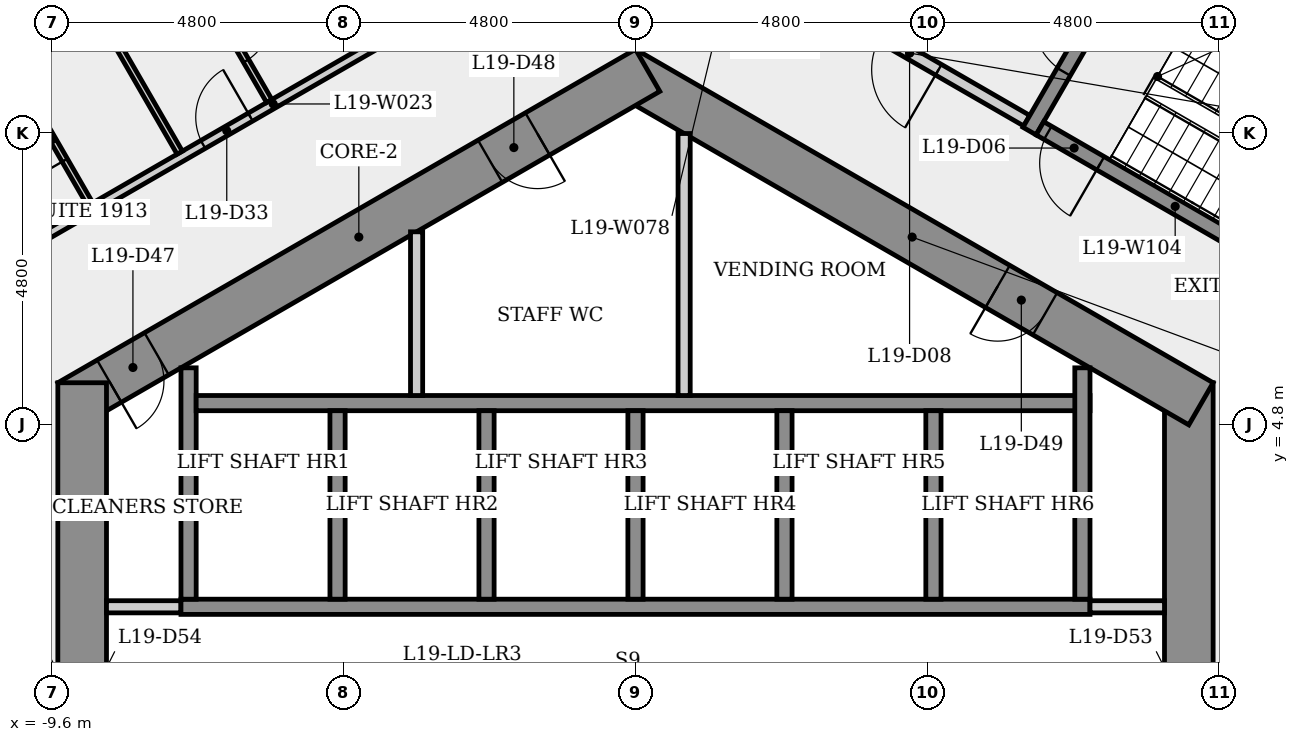
"""IFC4 building model, lengths in metres.
Left out: names, types, materials, properties, quantities, classifications, styles, units other than length and angle.
Written with IfcOpenShell. Run it as: python <this file> out.ifc"""

import sys

from ifc_helpers import new_model, si_unit, direction, frame, frame_2d, origin, place, context, subcontext, project, spatial, rectangle, extrude, element, fill, save


model = new_model("IFC4")
c1 = context("Model", 3, precision=1e-05, world=origin(), true_north=direction((0.0, 1.0)))
c2 = subcontext(c1, "Body", "Model", "MODEL_VIEW")
j1 = project(units=[si_unit("LENGTHUNIT", "METRE"), si_unit("PLANEANGLEUNIT", "RADIAN")], contexts=[c1])
p1 = place(None, origin())
s1 = spatial("IfcSite", under=j1, at=p1, CompositionType="ELEMENT")
p2 = place(p1, origin())
s2 = spatial("IfcBuilding", under=s1, at=p2, CompositionType="ELEMENT")
p3 = place(p2, frame((0.0, 0.0, 74.3)))
s3 = spatial("IfcBuildingStorey", under=s2, at=p3, CompositionType="ELEMENT", Elevation=74.3)
p4 = place(p3, frame((9.1, -5.485, 0.0), z_axis=(0.0, 0.0, 1.0), x_axis=(0.0, 1.0, 0.0)))
e1 = element("IfcWall", 1, at=p4, inside=s3, PredefinedType="SHEAR", context=c2, shape_type="SweptSolid", body=[
    extrude(rectangle(XDim=10.97, YDim=0.8, at=frame_2d((5.485, 0.0))), origin(), (0.0, 0.0, 1.0), 4.0),
])
p5 = place(p4, frame((4.685, 0.0, 0.0)))
e2 = element("IfcOpeningElement", 2, at=p5, cuts=e1, PredefinedType="OPENING", context=c2, shape_type="SweptSolid", body=[
    extrude(rectangle(XDim=1.6, YDim=2.1, at=frame_2d((0.8, 1.05))), frame((0.0, 0.41, 0.0), z_axis=(0.0, -1.0, 0.0), x_axis=(1.0, 0.0, 0.0)), (0.0, 0.0, 1.0), 0.82),
])
p6 = place(p3, frame((9.3, 5.138, 0.0), z_axis=(0.0, 0.0, 1.0), x_axis=(-0.866023993627, 0.500002442456, 0.0)))
e3 = element("IfcWall", 3, at=p6, inside=s3, PredefinedType="SHEAR", context=c2, shape_type="SweptSolid", body=[
    extrude(rectangle(XDim=10.97, YDim=0.8, at=frame_2d((5.485, 0.0))), origin(), (0.0, 0.0, 1.0), 4.0),
])
p7 = place(p6, frame((2.962, 0.0, 0.0)))
e4 = element("IfcOpeningElement", 4, at=p7, cuts=e3, PredefinedType="OPENING", context=c2, shape_type="SweptSolid", body=[
    extrude(rectangle(XDim=0.9, YDim=2.1, at=frame_2d((0.45, 1.05))), frame((0.0, 0.41, 0.0), z_axis=(0.0, -1.0, 0.0), x_axis=(1.0, 0.0, 0.0)), (0.0, 0.0, 1.0), 0.82),
])
p8 = place(p3, frame((0.2, 10.623, 0.0), z_axis=(0.0, 0.0, 1.0), x_axis=(-0.866023993627, -0.500002442456, 0.0)))
e5 = element("IfcWall", 5, at=p8, inside=s3, PredefinedType="SHEAR", context=c2, shape_type="SweptSolid", body=[
    extrude(rectangle(XDim=10.97, YDim=0.8, at=frame_2d((5.485, 0.0))), origin(), (0.0, 0.0, 1.0), 4.0),
])
p9 = place(p8, frame((9.325, 0.0, 0.0)))
e6 = element("IfcOpeningElement", 6, at=p9, cuts=e5, PredefinedType="OPENING", context=c2, shape_type="SweptSolid", body=[
    extrude(rectangle(XDim=0.9, YDim=2.1, at=frame_2d((0.45, 1.05))), frame((0.0, 0.41, 0.0), z_axis=(0.0, -1.0, 0.0), x_axis=(1.0, 0.0, 0.0)), (0.0, 0.0, 1.0), 0.82),
])
p10 = place(p8, frame((2.091, 0.0, 0.0)))
e7 = element("IfcOpeningElement", 7, at=p10, cuts=e5, PredefinedType="OPENING", context=c2, shape_type="SweptSolid", body=[
    extrude(rectangle(XDim=0.9, YDim=2.1, at=frame_2d((0.45, 1.05))), frame((0.0, 0.41, 0.0), z_axis=(0.0, -1.0, 0.0), x_axis=(1.0, 0.0, 0.0)), (0.0, 0.0, 1.0), 0.82),
])
p11 = place(p3, frame((-9.1, 5.485, 0.0), z_axis=(0.0, 0.0, 1.0), x_axis=(0.0, -1.0, 0.0)))
e8 = element("IfcWall", 8, at=p11, inside=s3, PredefinedType="SHEAR", context=c2, shape_type="SweptSolid", body=[
    extrude(rectangle(XDim=10.97, YDim=0.8, at=frame_2d((5.485, 0.0))), origin(), (0.0, 0.0, 1.0), 4.0),
])
p12 = place(p11, frame((4.685, 0.0, 0.0)))
e9 = element("IfcOpeningElement", 9, at=p12, cuts=e8, PredefinedType="OPENING", context=c2, shape_type="SweptSolid", body=[
    extrude(rectangle(XDim=1.6, YDim=2.1, at=frame_2d((0.8, 1.05))), frame((0.0, 0.41, 0.0), z_axis=(0.0, -1.0, 0.0), x_axis=(1.0, 0.0, 0.0)), (0.0, 0.0, 1.0), 0.82),
])
p13 = place(p3, frame((-10.609, 7.385, 0.0), z_axis=(0.0, 0.0, 1.0), x_axis=(0.866027371756, 0.499996591357, 0.0)))
e10 = element("IfcWall", 10, at=p13, inside=s3, PredefinedType="PARTITIONING", context=c2, shape_type="SweptSolid", body=[
    extrude(rectangle(XDim=10.741, YDim=0.15, at=frame_2d((5.371, 0.0))), origin(), (0.0, 0.0, 1.0), 3.6),
])
p14 = place(p13, frame((4.039, 0.0, 0.0)))
e11 = element("IfcOpeningElement", 11, at=p14, cuts=e10, PredefinedType="OPENING", context=c2, shape_type="SweptSolid", body=[
    extrude(rectangle(XDim=0.9, YDim=2.1, at=frame_2d((0.45, 1.05))), frame((0.0, 0.085, 0.0), z_axis=(0.0, -1.0, 0.0), x_axis=(1.0, 0.0, 0.0)), (0.0, 0.0, 1.0), 0.17),
])
p15 = place(p3, frame((-8.968, 8.419, 0.0), z_axis=(0.0, 0.0, 1.0), x_axis=(-0.4999899861, 0.866031185235, 0.0)))
e12 = element("IfcWall", 12, at=p15, inside=s3, PredefinedType="PARTITIONING", context=c2, shape_type="SweptSolid", body=[
    extrude(rectangle(XDim=2.475, YDim=0.1, at=frame_2d((1.238, 0.0))), origin(), (0.0, 0.0, 1.0), 3.6),
])
p16 = place(p15, frame((0.837, 0.0, 0.0)))
e13 = element("IfcOpeningElement", 13, at=p16, cuts=e12, PredefinedType="OPENING", context=c2, shape_type="SweptSolid", body=[
    extrude(rectangle(XDim=0.8, YDim=2.1, at=frame_2d((0.4, 1.05))), frame((0.0, 0.06, 0.0), z_axis=(0.0, -1.0, 0.0), x_axis=(1.0, 0.0, 0.0)), (0.0, 0.0, 1.0), 0.12),
])
p17 = place(p3, frame((-8.7, 1.8, 0.0), z_axis=(0.0, 0.0, 1.0), x_axis=(1.0, 0.0, 0.0)))
e14 = element("IfcWall", 14, at=p17, inside=s3, PredefinedType="PARTITIONING", context=c2, shape_type="SweptSolid", body=[
    extrude(rectangle(XDim=1.225, YDim=0.2, at=frame_2d((0.613, 0.0))), origin(), (0.0, 0.0, 1.0), 3.6),
])
p18 = place(p3, frame((-7.496, 9.269, 0.0), z_axis=(0.0, 0.0, 1.0), x_axis=(-0.500009404554, 0.866019973994, 0.0)))
e15 = element("IfcWall", 15, at=p18, inside=s3, PredefinedType="PARTITIONING", context=c2, shape_type="SweptSolid", body=[
    extrude(rectangle(XDim=9.01, YDim=0.1, at=frame_2d((4.505, 0.0))), origin(), (0.0, 0.0, 1.0), 3.6),
])
p19 = place(p3, frame((-7.475, 1.8, 0.0), z_axis=(0.0, 0.0, 1.0), x_axis=(1.0, 0.0, 0.0)))
e16 = element("IfcWall", 16, at=p19, inside=s3, PredefinedType="SHEAR", context=c2, shape_type="SweptSolid", body=[
    extrude(rectangle(XDim=14.95, YDim=0.25, at=frame_2d((7.475, 0.0))), origin(), (0.0, 0.0, 1.0), 3.6),
])
p20 = place(p3, frame((-7.35, 1.925, 0.0), z_axis=(0.0, 0.0, 1.0), x_axis=(0.0, 1.0, 0.0)))
e17 = element("IfcWall", 17, at=p20, inside=s3, PredefinedType="SHEAR", context=c2, shape_type="SweptSolid", body=[
    extrude(rectangle(XDim=3.805, YDim=0.25, at=frame_2d((1.903, 0.0))), origin(), (0.0, 0.0, 1.0), 3.6),
])
p21 = place(p3, frame((-7.225, 5.15, 0.0), z_axis=(0.0, 0.0, 1.0), x_axis=(1.0, 0.0, 0.0)))
e18 = element("IfcWall", 18, at=p21, inside=s3, PredefinedType="SHEAR", context=c2, shape_type="SweptSolid", body=[
    extrude(rectangle(XDim=14.7, YDim=0.25, at=frame_2d((7.35, 0.0))), origin(), (0.0, 0.0, 1.0), 3.6),
])
p22 = place(p3, frame((-7.211, 12.176, 0.0), z_axis=(0.0, 0.0, 1.0), x_axis=(0.499986429846, -0.866033238375, 0.0)))
e19 = element("IfcWall", 19, at=p22, inside=s3, PredefinedType="PARTITIONING", context=c2, shape_type="SweptSolid", body=[
    extrude(rectangle(XDim=2.375, YDim=0.1, at=frame_2d((1.188, 0.0))), origin(), (0.0, 0.0, 1.0), 3.6),
])
p23 = place(p22, frame((0.812, 0.0, 0.0)))
e20 = element("IfcOpeningElement", 20, at=p23, cuts=e19, PredefinedType="OPENING", context=c2, shape_type="SweptSolid", body=[
    extrude(rectangle(XDim=0.8, YDim=2.1, at=frame_2d((0.4, 1.05))), frame((0.0, 0.06, 0.0), z_axis=(0.0, -1.0, 0.0), x_axis=(1.0, 0.0, 0.0)), (0.0, 0.0, 1.0), 0.12),
])
p24 = place(p3, frame((-4.9, 5.025, 0.0), z_axis=(0.0, 0.0, 1.0), x_axis=(0.0, -1.0, 0.0)))
e21 = element("IfcWall", 21, at=p24, inside=s3, PredefinedType="SHEAR", context=c2, shape_type="SweptSolid", body=[
    extrude(rectangle(XDim=3.1, YDim=0.25, at=frame_2d((1.55, 0.0))), origin(), (0.0, 0.0, 1.0), 4.0),
])
p25 = place(p3, frame((-3.6, 7.967, 0.0), z_axis=(0.0, 0.0, 1.0), x_axis=(0.0, -1.0, 0.0)))
e22 = element("IfcWall", 22, at=p25, inside=s3, PredefinedType="PARTITIONING", context=c2, shape_type="SweptSolid", body=[
    extrude(rectangle(XDim=2.692, YDim=0.2, at=frame_2d((1.346, 0.0))), origin(), (0.0, 0.0, 1.0), 3.6),
])
for number, where, z_axis, x_axis in (
    (23, (-2.45, 5.025, 0.0), (0.0, 0.0, 1.0), (0.0, -1.0, 0.0)),
    (24, (0.0, 5.025, 0.0), (0.0, 0.0, 1.0), (0.0, -1.0, 0.0)),
):
    element("IfcWall", number, at=place(p3, frame(where, z_axis=z_axis, x_axis=x_axis)), inside=s3, PredefinedType="SHEAR", context=c2, shape_type="SweptSolid", body=[
        extrude(rectangle(XDim=3.1, YDim=0.25, at=frame_2d((1.55, 0.0))), origin(), (0.0, 0.0, 1.0), 4.0),
    ])
p26 = place(p3, frame((0.8, 9.584, 0.0), z_axis=(0.0, 0.0, 1.0), x_axis=(0.0, -1.0, 0.0)))
e25 = element("IfcWall", 25, at=p26, inside=s3, PredefinedType="PARTITIONING", context=c2, shape_type="SweptSolid", body=[
    extrude(rectangle(XDim=4.309, YDim=0.2, at=frame_2d((2.155, 0.0))), origin(), (0.0, 0.0, 1.0), 3.6),
])
for number, where, z_axis, x_axis in (
    (26, (2.45, 5.025, 0.0), (0.0, 0.0, 1.0), (0.0, -1.0, 0.0)),
    (27, (4.9, 5.025, 0.0), (0.0, 0.0, 1.0), (0.0, -1.0, 0.0)),
):
    element("IfcWall", number, at=place(p3, frame(where, z_axis=z_axis, x_axis=x_axis)), inside=s3, PredefinedType="SHEAR", context=c2, shape_type="SweptSolid", body=[
        extrude(rectangle(XDim=3.1, YDim=0.25, at=frame_2d((1.55, 0.0))), origin(), (0.0, 0.0, 1.0), 4.0),
    ])
p27 = place(p3, frame((6.435, 9.795, 0.0), z_axis=(0.0, 0.0, 1.0), x_axis=(-0.866012907634, 0.500021643343, 0.0)))
e28 = element("IfcWall", 28, at=p27, inside=s3, PredefinedType="PARTITIONING", context=c2, shape_type="SweptSolid", body=[
    extrude(rectangle(XDim=4.45, YDim=0.2, at=frame_2d((2.225, 0.0))), origin(), (0.0, 0.0, 1.0), 3.6),
])
p28 = place(p27, frame((1.675, 0.0, 0.0)))
e29 = element("IfcOpeningElement", 29, at=p28, cuts=e28, PredefinedType="OPENING", context=c2, shape_type="SweptSolid", body=[
    extrude(rectangle(XDim=1.1, YDim=2.1, at=frame_2d((0.55, 1.05))), frame((0.0, 0.11, 0.0), z_axis=(0.0, -1.0, 0.0), x_axis=(1.0, 0.0, 0.0)), (0.0, 0.0, 1.0), 0.22),
])
p29 = place(p3, frame((6.48, 9.624, 0.0), z_axis=(0.0, 0.0, 1.0), x_axis=(0.500017246033, 0.866015446554, 0.0)))
e30 = element("IfcWall", 30, at=p29, inside=s3, PredefinedType="SHEAR", context=c2, shape_type="SweptSolid", body=[
    extrude(rectangle(XDim=3.25, YDim=0.25, at=frame_2d((1.625, 0.0))), origin(), (0.0, 0.0, 1.0), 3.6),
])
p30 = place(p29, frame((1.125, 0.0, 0.0)))
e31 = element("IfcOpeningElement", 31, at=p30, cuts=e30, PredefinedType="OPENING", context=c2, shape_type="SweptSolid", body=[
    extrude(rectangle(XDim=1.0, YDim=2.1, at=frame_2d((0.5, 1.05))), frame((0.0, 0.135, 0.0), z_axis=(0.0, -1.0, 0.0), x_axis=(1.0, 0.0, 0.0)), (0.0, 0.0, 1.0), 0.27),
])
p31 = place(p3, frame((7.475, 1.8, 0.0), z_axis=(0.0, 0.0, 1.0), x_axis=(1.0, 0.0, 0.0)))
e32 = element("IfcWall", 32, at=p31, inside=s3, PredefinedType="PARTITIONING", context=c2, shape_type="SweptSolid", body=[
    extrude(rectangle(XDim=1.225, YDim=0.2, at=frame_2d((0.613, 0.0))), origin(), (0.0, 0.0, 1.0), 3.6),
])
p32 = place(p3, frame((7.35, 5.73, 0.0), z_axis=(0.0, 0.0, 1.0), x_axis=(0.0, -1.0, 0.0)))
e33 = element("IfcWall", 33, at=p32, inside=s3, PredefinedType="SHEAR", context=c2, shape_type="SweptSolid", body=[
    extrude(rectangle(XDim=3.805, YDim=0.25, at=frame_2d((1.903, 0.0))), origin(), (0.0, 0.0, 1.0), 3.6),
])
p33 = place(p3, frame((8.151, 12.268, 0.0), z_axis=(0.0, 0.0, 1.0), x_axis=(0.866025499775, -0.499999833739, 0.0)))
e34 = element("IfcWall", 34, at=p33, inside=s3, PredefinedType="SHEAR", context=c2, shape_type="SweptSolid", body=[
    extrude(rectangle(XDim=6.4, YDim=0.25, at=frame_2d((3.2, 0.0))), origin(), (0.0, 0.0, 1.0), 3.6),
])
p34 = place(p3, frame((11.1, 7.101, 0.0), z_axis=(0.0, 0.0, 1.0), x_axis=(-0.8660265141, 0.499998076872, 0.0)))
e35 = element("IfcWall", 35, at=p34, inside=s3, PredefinedType="SHEAR", context=c2, shape_type="SweptSolid", body=[
    extrude(rectangle(XDim=5.137, YDim=0.25, at=frame_2d((2.569, 0.0))), origin(), (0.0, 0.0, 1.0), 3.6),
])
p35 = place(p34, frame((3.987, 0.0, 0.0)))
e36 = element("IfcOpeningElement", 36, at=p35, cuts=e35, PredefinedType="OPENING", context=c2, shape_type="SweptSolid", body=[
    extrude(rectangle(XDim=1.0, YDim=2.1, at=frame_2d((0.5, 1.05))), frame((0.0, 0.135, 0.0), z_axis=(0.0, -1.0, 0.0), x_axis=(1.0, 0.0, 0.0)), (0.0, 0.0, 1.0), 0.27),
])
p36 = place(p35, origin())
e37 = element("IfcDoor", 37, at=p36, inside=s3, OperationType="SINGLE_SWING_LEFT", PredefinedType="DOOR", context=c2, shape_type="SweptSolid", body=[
    extrude(rectangle(XDim=1.0, YDim=2.1, at=frame_2d((0.5, 1.05))), frame((0.0, 0.025, 0.0), z_axis=(0.0, -1.0, 0.0), x_axis=(1.0, 0.0, 0.0)), (0.0, 0.0, 1.0), 0.05),
])
fill(e36, e37)
p37 = place(p30, origin())
e38 = element("IfcDoor", 38, at=p37, inside=s3, OperationType="SINGLE_SWING_RIGHT", PredefinedType="DOOR", context=c2, shape_type="SweptSolid", body=[
    extrude(rectangle(XDim=1.0, YDim=2.1, at=frame_2d((0.5, 1.05))), frame((0.0, 0.025, 0.0), z_axis=(0.0, -1.0, 0.0), x_axis=(1.0, 0.0, 0.0)), (0.0, 0.0, 1.0), 0.05),
])
fill(e31, e38)
p38 = place(p28, origin())
e39 = element("IfcDoor", 39, at=p38, inside=s3, OperationType="SINGLE_SWING_LEFT", PredefinedType="DOOR", context=c2, shape_type="SweptSolid", body=[
    extrude(rectangle(XDim=1.1, YDim=2.1, at=frame_2d((0.55, 1.05))), frame((0.0, 0.025, 0.0), z_axis=(0.0, -1.0, 0.0), x_axis=(1.0, 0.0, 0.0)), (0.0, 0.0, 1.0), 0.05),
])
fill(e29, e39)
p39 = place(p14, origin())
e40 = element("IfcDoor", 40, at=p39, inside=s3, OperationType="SINGLE_SWING_RIGHT", PredefinedType="DOOR", context=c2, shape_type="SweptSolid", body=[
    extrude(rectangle(XDim=0.9, YDim=2.1, at=frame_2d((0.45, 1.05))), frame((0.0, 0.025, 0.0), z_axis=(0.0, -1.0, 0.0), x_axis=(1.0, 0.0, 0.0)), (0.0, 0.0, 1.0), 0.05),
])
fill(e11, e40)
p40 = place(p23, origin())
e41 = element("IfcDoor", 41, at=p40, inside=s3, OperationType="SINGLE_SWING_LEFT", PredefinedType="DOOR", context=c2, shape_type="SweptSolid", body=[
    extrude(rectangle(XDim=0.8, YDim=2.1, at=frame_2d((0.4, 1.05))), frame((0.0, 0.025, 0.0), z_axis=(0.0, -1.0, 0.0), x_axis=(1.0, 0.0, 0.0)), (0.0, 0.0, 1.0), 0.05),
])
fill(e20, e41)
p41 = place(p16, origin())
e42 = element("IfcDoor", 42, at=p41, inside=s3, OperationType="SINGLE_SWING_LEFT", PredefinedType="DOOR", context=c2, shape_type="SweptSolid", body=[
    extrude(rectangle(XDim=0.8, YDim=2.1, at=frame_2d((0.4, 1.05))), frame((0.0, 0.025, 0.0), z_axis=(0.0, -1.0, 0.0), x_axis=(1.0, 0.0, 0.0)), (0.0, 0.0, 1.0), 0.05),
])
fill(e13, e42)
p42 = place(p9, origin())
e43 = element("IfcDoor", 43, at=p42, inside=s3, OperationType="SINGLE_SWING_RIGHT", PredefinedType="DOOR", context=c2, shape_type="SweptSolid", body=[
    extrude(rectangle(XDim=0.9, YDim=2.1, at=frame_2d((0.45, 1.05))), frame((0.0, 0.025, 0.0), z_axis=(0.0, -1.0, 0.0), x_axis=(1.0, 0.0, 0.0)), (0.0, 0.0, 1.0), 0.05),
])
fill(e6, e43)
p43 = place(p10, origin())
e44 = element("IfcDoor", 44, at=p43, inside=s3, OperationType="SINGLE_SWING_LEFT", PredefinedType="DOOR", context=c2, shape_type="SweptSolid", body=[
    extrude(rectangle(XDim=0.9, YDim=2.1, at=frame_2d((0.45, 1.05))), frame((0.0, 0.025, 0.0), z_axis=(0.0, -1.0, 0.0), x_axis=(1.0, 0.0, 0.0)), (0.0, 0.0, 1.0), 0.05),
])
fill(e7, e44)
p44 = place(p7, origin())
e45 = element("IfcDoor", 45, at=p44, inside=s3, OperationType="SINGLE_SWING_RIGHT", PredefinedType="DOOR", context=c2, shape_type="SweptSolid", body=[
    extrude(rectangle(XDim=0.9, YDim=2.1, at=frame_2d((0.45, 1.05))), frame((0.0, 0.025, 0.0), z_axis=(0.0, -1.0, 0.0), x_axis=(1.0, 0.0, 0.0)), (0.0, 0.0, 1.0), 0.05),
])
fill(e4, e45)
save(model, sys.argv[1])
